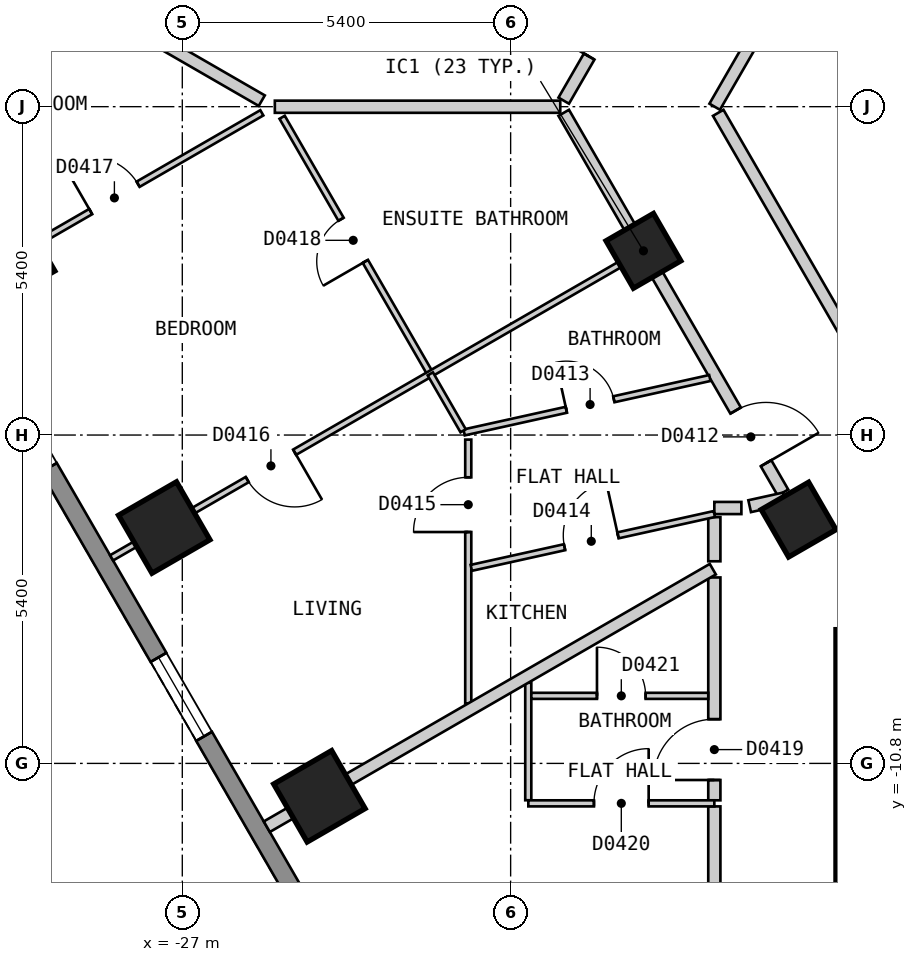
"""IFC4 building model, lengths in metres.
Left out: names, types, materials, properties, quantities, classifications, styles, units other than length and angle.
Written with IfcOpenShell. Run it as: python <this file> out.ifc"""

import sys

from ifc_helpers import new_model, si_unit, direction, frame, frame_2d, origin, origin_2d, place, context, subcontext, project, spatial, polyline, rectangle, outline, extrude, element, fill, save


model = new_model("IFC4")
c1 = context("Model", 3, precision=1e-05, world=origin(), true_north=direction((0.0, 1.0)))
c2 = subcontext(c1, "Body", "Model", "MODEL_VIEW")
j1 = project(units=[si_unit("LENGTHUNIT", "METRE"), si_unit("PLANEANGLEUNIT", "RADIAN")], contexts=[c1])
p1 = place(None, origin())
s1 = spatial("IfcSite", under=j1, at=p1, CompositionType="ELEMENT")
p2 = place(p1, origin())
s2 = spatial("IfcBuilding", under=s1, at=p2, CompositionType="ELEMENT")
p3 = place(p2, frame((0.0, 0.0, 26.4)))
s3 = spatial("IfcBuildingStorey", under=s2, at=p3, CompositionType="ELEMENT", Elevation=26.4)
for number, where, z_axis, x_axis in (
    (1, (-29.848, -2.5, 0.0), (0.0, 0.0, 1.0), (0.5, -0.866, 0.0)),
    (2, (-27.297, -6.921, 0.0), (0.0, 0.0, 1.0), (0.5, -0.866, 0.0)),
    (3, (-24.745, -11.341, 0.0), (0.0, 0.0, 1.0), (0.5, -0.866, 0.0)),
):
    element("IfcColumn", number, at=place(p3, frame(where, z_axis=z_axis, x_axis=x_axis)), inside=s3, PredefinedType="COLUMN", context=c2, shape_type="SweptSolid", body=[
        extrude(rectangle(XDim=1.1, YDim=1.1, at=origin_2d()), origin(), (0.0, 0.0, 1.0), 3.0),
    ])
for number, where, z_axis, x_axis in (
    (4, (-19.416, -2.371, 0.0), (0.0, 0.0, 1.0), (0.5, -0.866, 0.0)),
    (5, (-16.864, -6.791, 0.0), (0.0, 0.0, 1.0), (0.5, -0.866, 0.0)),
):
    element("IfcColumn", number, at=place(p3, frame(where, z_axis=z_axis, x_axis=x_axis)), inside=s3, PredefinedType="COLUMN", context=c2, shape_type="SweptSolid", body=[
        extrude(rectangle(XDim=0.9, YDim=0.9, at=origin_2d()), origin(), (0.0, 0.0, 1.0), 3.0),
    ])
p4 = place(p3, frame((-31.22, -2.425, 0.0), z_axis=(0.0, 0.0, 1.0), x_axis=(0.500001938803, -0.866024284413, 0.0)))
e6 = element("IfcWall", 6, at=p4, inside=s3, PredefinedType="SOLIDWALL", context=c2, shape_type="SweptSolid", body=[
    extrude(outline(polyline([(0.0, -0.15), (27.02, -0.15), (26.94, 0.15), (0.08, 0.15), (0.0, -0.15)])), origin(), (0.0, 0.0, 1.0), 2.7),
])
p5 = place(p4, frame((2.553, 0.0, 0.15)))
e7 = element("IfcOpeningElement", 7, at=p5, cuts=e6, PredefinedType="OPENING", context=c2, shape_type="SweptSolid", body=[
    extrude(rectangle(XDim=1.5, YDim=2.1, at=frame_2d((0.75, 1.05))), frame((0.0, 0.16, 0.0), z_axis=(0.0, -1.0, 0.0), x_axis=(1.0, 0.0, 0.0)), (0.0, 0.0, 1.0), 0.32),
])
p6 = place(p4, frame((7.657, 0.0, 0.15)))
e8 = element("IfcOpeningElement", 8, at=p6, cuts=e6, PredefinedType="OPENING", context=c2, shape_type="SweptSolid", body=[
    extrude(rectangle(XDim=1.5, YDim=2.1, at=frame_2d((0.75, 1.05))), frame((0.0, 0.16, 0.0), z_axis=(0.0, -1.0, 0.0), x_axis=(1.0, 0.0, 0.0)), (0.0, 0.0, 1.0), 0.32),
])
p7 = place(p4, frame((12.761, 0.0, 0.15)))
e9 = element("IfcOpeningElement", 9, at=p7, cuts=e6, PredefinedType="OPENING", context=c2, shape_type="SweptSolid", body=[
    extrude(rectangle(XDim=1.5, YDim=2.1, at=frame_2d((0.75, 1.05))), frame((0.0, 0.16, 0.0), z_axis=(0.0, -1.0, 0.0), x_axis=(1.0, 0.0, 0.0)), (0.0, 0.0, 1.0), 0.32),
])
p8 = place(p4, frame((17.865, 0.0, 0.15)))
e10 = element("IfcOpeningElement", 10, at=p8, cuts=e6, PredefinedType="OPENING", context=c2, shape_type="SweptSolid", body=[
    extrude(rectangle(XDim=1.5, YDim=2.1, at=frame_2d((0.75, 1.05))), frame((0.0, 0.16, 0.0), z_axis=(0.0, -1.0, 0.0), x_axis=(1.0, 0.0, 0.0)), (0.0, 0.0, 1.0), 0.32),
])
p9 = place(p4, frame((22.969, 0.0, 0.15)))
e11 = element("IfcOpeningElement", 11, at=p9, cuts=e6, PredefinedType="OPENING", context=c2, shape_type="SweptSolid", body=[
    extrude(rectangle(XDim=1.5, YDim=2.1, at=frame_2d((0.75, 1.05))), frame((0.0, 0.16, 0.0), z_axis=(0.0, -1.0, 0.0), x_axis=(1.0, 0.0, 0.0)), (0.0, 0.0, 1.0), 0.32),
])
p10 = place(p3, frame((-18.186, -0.101, 0.0), z_axis=(0.0, 0.0, 1.0), x_axis=(0.499997591167, -0.86602679452, 0.0)))
e12 = element("IfcWall", 12, at=p10, inside=s3, PredefinedType="PARTITIONING", context=c2, shape_type="SweptSolid", body=[
    extrude(rectangle(XDim=5.172, YDim=0.2, at=frame_2d((2.586, 0.0))), origin(), (0.0, 0.0, 1.0), 2.7),
])
p11 = place(p3, frame((-20.727, -0.101, 0.0), z_axis=(0.0, 0.0, 1.0), x_axis=(0.500049702773, -0.865996705973, 0.0)))
e13 = element("IfcWall", 13, at=p11, inside=s3, PredefinedType="PARTITIONING", context=c2, shape_type="SweptSolid", body=[
    extrude(rectangle(XDim=7.211, YDim=0.2, at=frame_2d((3.605, 0.0))), origin(), (0.0, 0.0, 1.0), 2.7),
])
p12 = place(p11, frame((5.654, 0.0, 0.0)))
e14 = element("IfcOpeningElement", 14, at=p12, cuts=e13, PredefinedType="OPENING", context=c2, shape_type="SweptSolid", body=[
    extrude(rectangle(XDim=1.0, YDim=2.1, at=frame_2d((0.5, 1.05))), frame((0.0, 0.11, 0.0), z_axis=(0.0, -1.0, 0.0), x_axis=(1.0, 0.0, 0.0)), (0.0, 0.0, 1.0), 0.22),
])
p13 = place(p3, frame((-18.25, -11.507, 0.0), z_axis=(0.0, 0.0, 1.0), x_axis=(0.0, -1.0, 0.0)))
e15 = element("IfcWall", 15, at=p13, inside=s3, PredefinedType="PARTITIONING", context=c2, shape_type="SweptSolid", body=[
    extrude(rectangle(XDim=4.792, YDim=0.2, at=frame_2d((2.396, 0.0))), origin(), (0.0, 0.0, 1.0), 2.7),
])
p14 = place(p3, frame((-18.25, -6.6, 0.0), z_axis=(0.0, 0.0, 1.0), x_axis=(1.0, 0.0, 0.0)))
e16 = element("IfcWall", 16, at=p14, inside=s3, PredefinedType="PARTITIONING", context=c2, shape_type="SweptSolid", body=[
    extrude(rectangle(XDim=0.445, YDim=0.2, at=frame_2d((0.223, 0.0))), origin(), (0.0, 0.0, 1.0), 2.7),
])
p15 = place(p3, frame((-18.244, -0.001, 0.0), z_axis=(0.0, 0.0, 1.0), x_axis=(0.499962999376, 0.866046765051, 0.0)))
e17 = element("IfcWall", 17, at=p15, inside=s3, PredefinedType="PARTITIONING", context=c2, shape_type="SweptSolid", body=[
    extrude(rectangle(XDim=18.245, YDim=0.2, at=frame_2d((9.123, 0.0))), origin(), (0.0, 0.0, 1.0), 2.7),
])
p16 = place(p15, frame((8.672, 0.0, 0.0)))
e18 = element("IfcOpeningElement", 18, at=p16, cuts=e17, PredefinedType="OPENING", context=c2, shape_type="SweptSolid", body=[
    extrude(rectangle(XDim=0.9, YDim=2.1, at=frame_2d((0.45, 1.05))), frame((0.0, 0.11, 0.0), z_axis=(0.0, -1.0, 0.0), x_axis=(1.0, 0.0, 0.0)), (0.0, 0.0, 1.0), 0.22),
])
p17 = place(p3, frame((-20.727, 0.099, 0.0), z_axis=(0.0, 0.0, 1.0), x_axis=(0.499993204491, 0.866029327138, 0.0)))
e19 = element("IfcWall", 19, at=p17, inside=s3, PredefinedType="PARTITIONING", context=c2, shape_type="SweptSolid", body=[
    extrude(rectangle(XDim=20.554, YDim=0.2, at=frame_2d((10.277, 0.0))), origin(), (0.0, 0.0, 1.0), 2.7),
])
p18 = place(p17, frame((18.916, 0.0, 0.0)))
e20 = element("IfcOpeningElement", 20, at=p18, cuts=e19, PredefinedType="OPENING", context=c2, shape_type="SweptSolid", body=[
    extrude(rectangle(XDim=0.8, YDim=2.1, at=frame_2d((0.4, 1.05))), frame((0.0, 0.11, 0.0), z_axis=(0.0, -1.0, 0.0), x_axis=(1.0, 0.0, 0.0)), (0.0, 0.0, 1.0), 0.22),
])
p19 = place(p17, frame((14.88, 0.0, 0.0)))
e21 = element("IfcOpeningElement", 21, at=p19, cuts=e19, PredefinedType="OPENING", context=c2, shape_type="SweptSolid", body=[
    extrude(rectangle(XDim=1.0, YDim=2.1, at=frame_2d((0.5, 1.05))), frame((0.0, 0.11, 0.0), z_axis=(0.0, -1.0, 0.0), x_axis=(1.0, 0.0, 0.0)), (0.0, 0.0, 1.0), 0.22),
])
p20 = place(p17, frame((9.776, 0.0, 0.0)))
e22 = element("IfcOpeningElement", 22, at=p20, cuts=e19, PredefinedType="OPENING", context=c2, shape_type="SweptSolid", body=[
    extrude(rectangle(XDim=1.0, YDim=2.1, at=frame_2d((0.5, 1.05))), frame((0.0, 0.11, 0.0), z_axis=(0.0, -1.0, 0.0), x_axis=(1.0, 0.0, 0.0)), (0.0, 0.0, 1.0), 0.22),
])
p21 = place(p17, frame((4.673, 0.0, 0.0)))
e23 = element("IfcOpeningElement", 23, at=p21, cuts=e19, PredefinedType="OPENING", context=c2, shape_type="SweptSolid", body=[
    extrude(rectangle(XDim=1.0, YDim=2.1, at=frame_2d((0.5, 1.05))), frame((0.0, 0.11, 0.0), z_axis=(0.0, -1.0, 0.0), x_axis=(1.0, 0.0, 0.0)), (0.0, 0.0, 1.0), 0.22),
])
p22 = place(p17, frame((0.838, 0.0, 0.0)))
e24 = element("IfcOpeningElement", 24, at=p22, cuts=e19, PredefinedType="OPENING", context=c2, shape_type="SweptSolid", body=[
    extrude(rectangle(XDim=0.8, YDim=2.1, at=frame_2d((0.4, 1.05))), frame((0.0, 0.11, 0.0), z_axis=(0.0, -1.0, 0.0), x_axis=(1.0, 0.0, 0.0)), (0.0, 0.0, 1.0), 0.22),
])
p23 = place(p3, frame((-18.25, -11.407, 0.0), z_axis=(0.0, 0.0, 1.0), x_axis=(0.0, 1.0, 0.0)))
e25 = element("IfcWall", 25, at=p23, inside=s3, PredefinedType="PARTITIONING", context=c2, shape_type="SweptSolid", body=[
    extrude(rectangle(XDim=3.665, YDim=0.2, at=frame_2d((1.833, 0.0))), origin(), (0.0, 0.0, 1.0), 2.7),
])
p24 = place(p23, frame((0.334, 0.0, 0.0)))
e26 = element("IfcOpeningElement", 26, at=p24, cuts=e25, PredefinedType="OPENING", context=c2, shape_type="SweptSolid", body=[
    extrude(rectangle(XDim=1.0, YDim=2.1, at=frame_2d((0.5, 1.05))), frame((0.0, 0.11, 0.0), z_axis=(0.0, -1.0, 0.0), x_axis=(1.0, 0.0, 0.0)), (0.0, 0.0, 1.0), 0.22),
])
p25 = place(p3, frame((-18.25, -7.476, 0.0), z_axis=(0.0, 0.0, 1.0), x_axis=(0.0, 1.0, 0.0)))
e27 = element("IfcWall", 27, at=p25, inside=s3, PredefinedType="PARTITIONING", context=c2, shape_type="SweptSolid", body=[
    extrude(rectangle(XDim=0.726, YDim=0.2, at=frame_2d((0.363, 0.0))), origin(), (0.0, 0.0, 1.0), 2.7),
])
p26 = place(p3, frame((-25.358, -0.174, 0.0), z_axis=(0.0, 0.0, 1.0), x_axis=(0.500093956194, -0.865971151354, 0.0)))
e28 = element("IfcWall", 28, at=p26, inside=s3, PredefinedType="PARTITIONING", context=c2, shape_type="SweptSolid", body=[
    extrude(rectangle(XDim=4.873, YDim=0.1, at=frame_2d((2.437, 0.0))), origin(), (0.0, 0.0, 1.0), 2.7),
])
p27 = place(p26, frame((1.937, 0.0, 0.0)))
e29 = element("IfcOpeningElement", 29, at=p27, cuts=e28, PredefinedType="OPENING", context=c2, shape_type="SweptSolid", body=[
    extrude(rectangle(XDim=0.8, YDim=2.1, at=frame_2d((0.4, 1.05))), frame((0.0, 0.06, 0.0), z_axis=(0.0, -1.0, 0.0), x_axis=(1.0, 0.0, 0.0)), (0.0, 0.0, 1.0), 0.12),
])
p28 = place(p3, frame((-21.31, -9.474, 0.0), z_axis=(0.0, 0.0, 1.0), x_axis=(0.0, -1.0, 0.0)))
e30 = element("IfcWall", 30, at=p28, inside=s3, PredefinedType="PARTITIONING", context=c2, shape_type="SweptSolid", body=[
    extrude(rectangle(XDim=1.932, YDim=0.1, at=frame_2d((0.966, 0.0))), origin(), (0.0, 0.0, 1.0), 2.7),
])
p29 = place(p3, frame((-21.26, -9.689, 0.0), z_axis=(0.0, 0.0, 1.0), x_axis=(1.0, 0.0, 0.0)))
e31 = element("IfcWall", 31, at=p29, inside=s3, PredefinedType="PARTITIONING", context=c2, shape_type="SweptSolid", body=[
    extrude(rectangle(XDim=2.91, YDim=0.1, at=frame_2d((1.455, 0.0))), origin(), (0.0, 0.0, 1.0), 2.7),
])
p30 = place(p29, frame((1.08, 0.0, 0.0)))
e32 = element("IfcOpeningElement", 32, at=p30, cuts=e31, PredefinedType="OPENING", context=c2, shape_type="SweptSolid", body=[
    extrude(rectangle(XDim=0.8, YDim=2.1, at=frame_2d((0.4, 1.05))), frame((0.0, 0.06, 0.0), z_axis=(0.0, -1.0, 0.0), x_axis=(1.0, 0.0, 0.0)), (0.0, 0.0, 1.0), 0.12),
])
p31 = place(p3, frame((-21.309, -11.457, 0.0), z_axis=(0.0, 0.0, 1.0), x_axis=(1.0, 0.0, 0.0)))
e33 = element("IfcWall", 33, at=p31, inside=s3, PredefinedType="PARTITIONING", context=c2, shape_type="SweptSolid", body=[
    extrude(rectangle(XDim=3.059, YDim=0.1, at=frame_2d((1.53, 0.0))), origin(), (0.0, 0.0, 1.0), 2.7),
])
p32 = place(p31, frame((1.079, 0.0, 0.0)))
e34 = element("IfcOpeningElement", 34, at=p32, cuts=e33, PredefinedType="OPENING", context=c2, shape_type="SweptSolid", body=[
    extrude(rectangle(XDim=0.9, YDim=2.1, at=frame_2d((0.45, 1.05))), frame((0.0, 0.06, 0.0), z_axis=(0.0, -1.0, 0.0), x_axis=(1.0, 0.0, 0.0)), (0.0, 0.0, 1.0), 0.12),
])
p33 = place(p3, frame((-22.297, -9.813, 0.0), z_axis=(0.0, 0.0, 1.0), x_axis=(0.0, 1.0, 0.0)))
e35 = element("IfcWall", 35, at=p33, inside=s3, PredefinedType="PARTITIONING", context=c2, shape_type="SweptSolid", body=[
    extrude(rectangle(XDim=4.338, YDim=0.1, at=frame_2d((2.169, 0.0))), origin(), (0.0, 0.0, 1.0), 2.7),
])
p34 = place(p33, frame((2.818, 0.0, 0.0)))
e36 = element("IfcOpeningElement", 36, at=p34, cuts=e35, PredefinedType="OPENING", context=c2, shape_type="SweptSolid", body=[
    extrude(rectangle(XDim=0.9, YDim=2.1, at=frame_2d((0.45, 1.05))), frame((0.0, 0.06, 0.0), z_axis=(0.0, -1.0, 0.0), x_axis=(1.0, 0.0, 0.0)), (0.0, 0.0, 1.0), 0.12),
])
p35 = place(p3, frame((-22.365, -5.357, 0.0), z_axis=(0.0, 0.0, 1.0), x_axis=(0.976339488582, 0.216243388421, 0.0)))
e37 = element("IfcWall", 37, at=p35, inside=s3, PredefinedType="PARTITIONING", context=c2, shape_type="SweptSolid", body=[
    extrude(rectangle(XDim=4.139, YDim=0.1, at=frame_2d((2.069, 0.0))), origin(), (0.0, 0.0, 1.0), 2.7),
])
p36 = place(p35, frame((1.722, 0.0, 0.0)))
e38 = element("IfcOpeningElement", 38, at=p36, cuts=e37, PredefinedType="OPENING", context=c2, shape_type="SweptSolid", body=[
    extrude(rectangle(XDim=0.8, YDim=2.1, at=frame_2d((0.4, 1.05))), frame((0.0, 0.06, 0.0), z_axis=(0.0, -1.0, 0.0), x_axis=(1.0, 0.0, 0.0)), (0.0, 0.0, 1.0), 0.12),
])
p37 = place(p3, frame((-22.247, -7.584, 0.0), z_axis=(0.0, 0.0, 1.0), x_axis=(0.97635375062, 0.216178985219, 0.0)))
e39 = element("IfcWall", 39, at=p37, inside=s3, PredefinedType="PARTITIONING", context=c2, shape_type="SweptSolid", body=[
    extrude(rectangle(XDim=4.094, YDim=0.1, at=frame_2d((2.047, 0.0))), origin(), (0.0, 0.0, 1.0), 2.7),
])
p38 = place(p37, frame((1.571, 0.0, 0.0)))
e40 = element("IfcOpeningElement", 40, at=p38, cuts=e39, PredefinedType="OPENING", context=c2, shape_type="SweptSolid", body=[
    extrude(rectangle(XDim=0.9, YDim=2.1, at=frame_2d((0.45, 1.05))), frame((0.0, 0.06, 0.0), z_axis=(0.0, -1.0, 0.0), x_axis=(1.0, 0.0, 0.0)), (0.0, 0.0, 1.0), 0.12),
])
p39 = place(p3, frame((-28.163, -7.42, 0.0), z_axis=(0.0, 0.0, 1.0), x_axis=(0.866065245018, 0.499930986609, 0.0)))
e41 = element("IfcWall", 41, at=p39, inside=s3, PredefinedType="PARTITIONING", context=c2, shape_type="SweptSolid", body=[
    extrude(rectangle(XDim=10.0, YDim=0.1, at=frame_2d((5.0, 0.0))), origin(), (0.0, 0.0, 1.0), 2.7),
])
p40 = place(p39, frame((2.576, 0.0, 0.0)))
e42 = element("IfcOpeningElement", 42, at=p40, cuts=e41, PredefinedType="OPENING", context=c2, shape_type="SweptSolid", body=[
    extrude(rectangle(XDim=0.9, YDim=2.1, at=frame_2d((0.45, 1.05))), frame((0.0, 0.06, 0.0), z_axis=(0.0, -1.0, 0.0), x_axis=(1.0, 0.0, 0.0)), (0.0, 0.0, 1.0), 0.12),
])
p41 = place(p3, frame((-30.715, -3.0, 0.0), z_axis=(0.0, 0.0, 1.0), x_axis=(0.866116197112, 0.49984270836, 0.0)))
e43 = element("IfcWall", 43, at=p41, inside=s3, PredefinedType="PARTITIONING", context=c2, shape_type="SweptSolid", body=[
    extrude(rectangle(XDim=5.8, YDim=0.1, at=frame_2d((2.9, 0.0))), origin(), (0.0, 0.0, 1.0), 2.7),
])
p42 = place(p41, frame((2.55, 0.0, 0.0)))
e44 = element("IfcOpeningElement", 44, at=p42, cuts=e43, PredefinedType="OPENING", context=c2, shape_type="SweptSolid", body=[
    extrude(rectangle(XDim=0.9, YDim=2.1, at=frame_2d((0.45, 1.05))), frame((0.0, 0.06, 0.0), z_axis=(0.0, -1.0, 0.0), x_axis=(1.0, 0.0, 0.0)), (0.0, 0.0, 1.0), 0.12),
])
p43 = place(p3, frame((-30.716, 2.999, 0.0), z_axis=(0.0, 0.0, 1.0), x_axis=(0.866032775405, -0.499987231761, 0.0)))
e45 = element("IfcWall", 45, at=p43, inside=s3, PredefinedType="PARTITIONING", context=c2, shape_type="SweptSolid", body=[
    extrude(rectangle(XDim=5.8, YDim=0.2, at=frame_2d((2.9, 0.0))), origin(), (0.0, 0.0, 1.0), 2.7),
])
p44 = place(p3, frame((-25.478, -0.001, 0.0), z_axis=(0.0, 0.0, 1.0), x_axis=(1.0, 0.0, 0.0)))
e46 = element("IfcWall", 46, at=p44, inside=s3, PredefinedType="PARTITIONING", context=c2, shape_type="SweptSolid", body=[
    extrude(rectangle(XDim=4.694, YDim=0.2, at=frame_2d((2.347, 0.0))), origin(), (0.0, 0.0, 1.0), 2.7),
])
p45 = place(p3, frame((-17.669, -6.57, 0.0), z_axis=(0.0, 0.0, 1.0), x_axis=(0.976422724526, 0.215867234728, 0.0)))
e47 = element("IfcWall", 47, at=p45, inside=s3, PredefinedType="PARTITIONING", context=c2, shape_type="SweptSolid", body=[
    extrude(rectangle(XDim=0.583, YDim=0.2, at=frame_2d((0.292, 0.0))), origin(), (0.0, 0.0, 1.0), 2.7),
])
p46 = place(p3, frame((-25.61, -11.841, 0.0), z_axis=(0.0, 0.0, 1.0), x_axis=(0.866019023803, 0.500011050288, 0.0)))
e48 = element("IfcWall", 48, at=p46, inside=s3, PredefinedType="PARTITIONING", context=c2, shape_type="SweptSolid", body=[
    extrude(rectangle(XDim=8.47, YDim=0.2, at=frame_2d((4.235, 0.0))), origin(), (0.0, 0.0, 1.0), 2.7),
])
p47 = place(p3, frame((-22.921, -4.394, 0.0), z_axis=(0.0, 0.0, 1.0), x_axis=(0.499565963512, -0.866275849889, 0.0)))
e49 = element("IfcWall", 49, at=p47, inside=s3, PredefinedType="PARTITIONING", context=c2, shape_type="SweptSolid", body=[
    extrude(rectangle(XDim=1.081, YDim=0.1, at=frame_2d((0.54, 0.0))), origin(), (0.0, 0.0, 1.0), 2.7),
])
p48 = place(p3, frame((-16.15, -14.4, 0.0), z_axis=(0.0, 0.0, 1.0), x_axis=(0.0, 1.0, 0.0)))
e50 = element("IfcWall", 50, at=p48, inside=s3, PredefinedType="SOLIDWALL", context=c2, shape_type="SweptSolid", body=[
    extrude(rectangle(XDim=5.8, YDim=0.2, at=frame_2d((2.9, 0.0))), origin(), (0.0, 0.0, 1.0), 2.7),
])
p49 = place(p6, origin())
e51 = element("IfcWindow", 51, at=p49, inside=s3, PartitioningType="SINGLE_PANEL", PredefinedType="WINDOW", context=c2, shape_type="SweptSolid", body=[
    extrude(rectangle(XDim=1.5, YDim=2.1, at=frame_2d((0.75, 1.05))), frame((0.0, 0.03, 0.0), z_axis=(0.0, -1.0, 0.0), x_axis=(1.0, 0.0, 0.0)), (0.0, 0.0, 1.0), 0.06),
])
fill(e8, e51)
p50 = place(p22, origin())
e52 = element("IfcDoor", 52, at=p50, inside=s3, OperationType="SINGLE_SWING_LEFT", PredefinedType="DOOR", context=c2, shape_type="SweptSolid", body=[
    extrude(rectangle(XDim=0.8, YDim=2.1, at=frame_2d((0.4, 1.05))), frame((0.0, 0.025, 0.0), z_axis=(0.0, -1.0, 0.0), x_axis=(1.0, 0.0, 0.0)), (0.0, 0.0, 1.0), 0.05),
])
fill(e24, e52)
p51 = place(p12, origin())
e53 = element("IfcDoor", 53, at=p51, inside=s3, OperationType="SINGLE_SWING_RIGHT", PredefinedType="DOOR", context=c2, shape_type="SweptSolid", body=[
    extrude(rectangle(XDim=1.0, YDim=2.1, at=frame_2d((0.5, 1.05))), frame((0.0, 0.025, 0.0), z_axis=(0.0, -1.0, 0.0), x_axis=(1.0, 0.0, 0.0)), (0.0, 0.0, 1.0), 0.05),
])
fill(e14, e53)
p52 = place(p36, origin())
e54 = element("IfcDoor", 54, at=p52, inside=s3, OperationType="SINGLE_SWING_LEFT", PredefinedType="DOOR", context=c2, shape_type="SweptSolid", body=[
    extrude(rectangle(XDim=0.8, YDim=2.1, at=frame_2d((0.4, 1.05))), frame((0.0, 0.025, 0.0), z_axis=(0.0, -1.0, 0.0), x_axis=(1.0, 0.0, 0.0)), (0.0, 0.0, 1.0), 0.05),
])
fill(e38, e54)
p53 = place(p38, origin())
e55 = element("IfcDoor", 55, at=p53, inside=s3, OperationType="SINGLE_SWING_RIGHT", PredefinedType="DOOR", context=c2, shape_type="SweptSolid", body=[
    extrude(rectangle(XDim=0.9, YDim=2.1, at=frame_2d((0.45, 1.05))), frame((0.0, 0.025, 0.0), z_axis=(0.0, -1.0, 0.0), x_axis=(1.0, 0.0, 0.0)), (0.0, 0.0, 1.0), 0.05),
])
fill(e40, e55)
p54 = place(p34, origin())
e56 = element("IfcDoor", 56, at=p54, inside=s3, OperationType="SINGLE_SWING_LEFT", PredefinedType="DOOR", context=c2, shape_type="SweptSolid", body=[
    extrude(rectangle(XDim=0.9, YDim=2.1, at=frame_2d((0.45, 1.05))), frame((0.0, 0.025, 0.0), z_axis=(0.0, -1.0, 0.0), x_axis=(1.0, 0.0, 0.0)), (0.0, 0.0, 1.0), 0.05),
])
fill(e36, e56)
p55 = place(p40, origin())
e57 = element("IfcDoor", 57, at=p55, inside=s3, OperationType="SINGLE_SWING_RIGHT", PredefinedType="DOOR", context=c2, shape_type="SweptSolid", body=[
    extrude(rectangle(XDim=0.9, YDim=2.1, at=frame_2d((0.45, 1.05))), frame((0.0, 0.025, 0.0), z_axis=(0.0, -1.0, 0.0), x_axis=(1.0, 0.0, 0.0)), (0.0, 0.0, 1.0), 0.05),
])
fill(e42, e57)
p56 = place(p42, origin())
e58 = element("IfcDoor", 58, at=p56, inside=s3, OperationType="SINGLE_SWING_LEFT", PredefinedType="DOOR", context=c2, shape_type="SweptSolid", body=[
    extrude(rectangle(XDim=0.9, YDim=2.1, at=frame_2d((0.45, 1.05))), frame((0.0, 0.025, 0.0), z_axis=(0.0, -1.0, 0.0), x_axis=(1.0, 0.0, 0.0)), (0.0, 0.0, 1.0), 0.05),
])
fill(e44, e58)
p57 = place(p27, origin())
e59 = element("IfcDoor", 59, at=p57, inside=s3, OperationType="SINGLE_SWING_RIGHT", PredefinedType="DOOR", context=c2, shape_type="SweptSolid", body=[
    extrude(rectangle(XDim=0.8, YDim=2.1, at=frame_2d((0.4, 1.05))), frame((0.0, 0.025, 0.0), z_axis=(0.0, -1.0, 0.0), x_axis=(1.0, 0.0, 0.0)), (0.0, 0.0, 1.0), 0.05),
])
fill(e29, e59)
p58 = place(p24, origin())
e60 = element("IfcDoor", 60, at=p58, inside=s3, OperationType="SINGLE_SWING_LEFT", PredefinedType="DOOR", context=c2, shape_type="SweptSolid", body=[
    extrude(rectangle(XDim=1.0, YDim=2.1, at=frame_2d((0.5, 1.05))), frame((0.0, 0.025, 0.0), z_axis=(0.0, -1.0, 0.0), x_axis=(1.0, 0.0, 0.0)), (0.0, 0.0, 1.0), 0.05),
])
fill(e26, e60)
p59 = place(p32, origin())
e61 = element("IfcDoor", 61, at=p59, inside=s3, OperationType="SINGLE_SWING_RIGHT", PredefinedType="DOOR", context=c2, shape_type="SweptSolid", body=[
    extrude(rectangle(XDim=0.9, YDim=2.1, at=frame_2d((0.45, 1.05))), frame((0.0, 0.025, 0.0), z_axis=(0.0, -1.0, 0.0), x_axis=(1.0, 0.0, 0.0)), (0.0, 0.0, 1.0), 0.05),
])
fill(e34, e61)
p60 = place(p30, origin())
e62 = element("IfcDoor", 62, at=p60, inside=s3, OperationType="SINGLE_SWING_LEFT", PredefinedType="DOOR", context=c2, shape_type="SweptSolid", body=[
    extrude(rectangle(XDim=0.8, YDim=2.1, at=frame_2d((0.4, 1.05))), frame((0.0, 0.025, 0.0), z_axis=(0.0, -1.0, 0.0), x_axis=(1.0, 0.0, 0.0)), (0.0, 0.0, 1.0), 0.05),
])
fill(e32, e62)
save(model, sys.argv[1])
